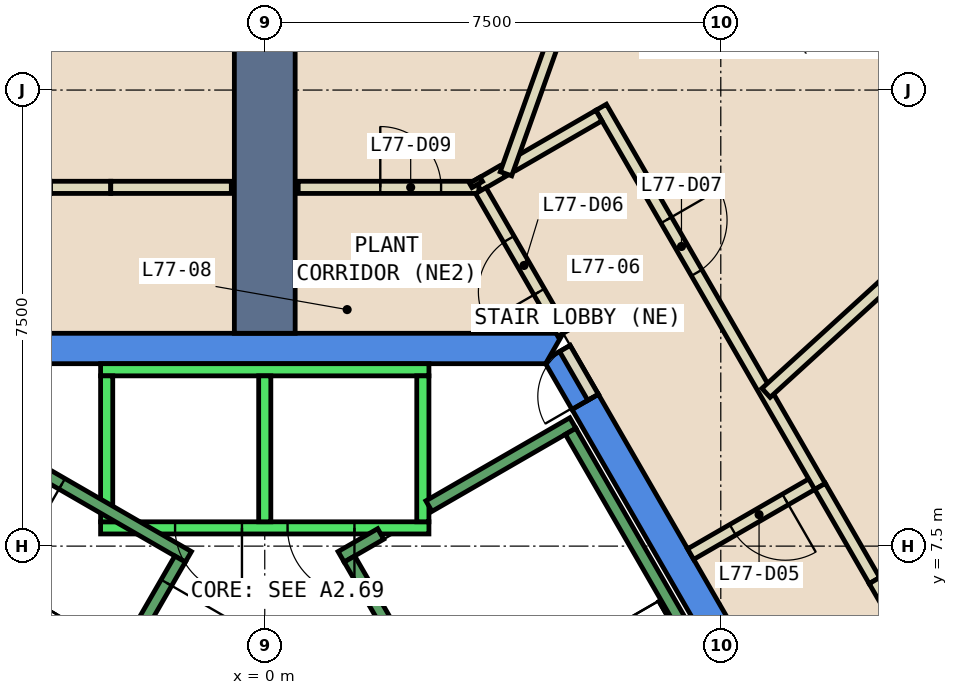
"""IFC4 building model, lengths in metres.
Left out: names, types, materials, properties, quantities, classifications, styles, units other than length and angle.
Written with IfcOpenShell. Run it as: python <this file> out.ifc"""

import sys

from ifc_helpers import new_model, si_unit, direction, frame, frame_2d, origin, place, context, subcontext, project, spatial, polyline, rectangle, outline, extrude, element, fill, save


model = new_model("IFC4")
c1 = context("Model", 3, precision=1e-05, world=origin(), true_north=direction((0.0, 1.0)))
c2 = subcontext(c1, "Body", "Model", "MODEL_VIEW")
j1 = project(units=[si_unit("LENGTHUNIT", "METRE"), si_unit("PLANEANGLEUNIT", "RADIAN")], contexts=[c1])
p1 = place(None, origin())
s1 = spatial("IfcSite", under=j1, at=p1, CompositionType="ELEMENT")
p2 = place(p1, origin())
s2 = spatial("IfcBuilding", under=s1, at=p2, CompositionType="ELEMENT")
p3 = place(p2, frame((0.0, 0.0, 326.0)))
s3 = spatial("IfcBuildingStorey", under=s2, at=p3, CompositionType="ELEMENT", Elevation=326.0)
p4 = place(p3, frame((0.0, 0.0, -0.6)))
e1 = element("IfcWall", 1, at=p4, inside=s3, PredefinedType="SHEAR", context=c2, shape_type="SweptSolid", body=[
    extrude(outline(polyline([(5.486, 9.998), (5.053, 9.748), (9.238, 2.5), (9.815, 2.5), (5.486, 9.998)])), origin(), (0.0, 0.0, 1.0), 5.55),
])
p5 = place(p3, frame((0.0, 0.0, 3.6)))
e2 = element("IfcWall", 2, at=p5, inside=s3, PredefinedType="SHEAR", context=c2, shape_type="SweptSolid", body=[
    extrude(outline(polyline([(5.022, 10.8), (4.677, 10.601), (4.619, 10.5), (5.053, 9.748), (5.486, 9.998), (5.022, 10.8)])), origin(), (0.0, 0.0, 1.0), 1.35),
])
p6 = place(p3, frame((0.0, 0.0, -0.6)))
e3 = element("IfcWall", 3, at=p6, inside=s3, PredefinedType="SHEAR", context=c2, shape_type="SweptSolid", body=[
    extrude(outline(polyline([(4.907, 11.0), (-4.907, 11.0), (-4.619, 10.5), (4.619, 10.5), (4.907, 11.0)])), origin(), (0.0, 0.0, 1.0), 5.55),
])
p7 = place(p3, frame((0.0, 11.0, 0.0), z_axis=(0.0, 0.0, 1.0), x_axis=(0.0, 1.0, 0.0)))
e4 = element("IfcWall", 4, at=p7, inside=s3, PredefinedType="SHEAR", context=c2, shape_type="SweptSolid", body=[
    extrude(rectangle(XDim=13.702, YDim=1.0, at=frame_2d((6.851, 0.0))), origin(), (0.0, 0.0, 1.0), 4.95),
])
p8 = place(p3, frame((9.082, 8.568, 0.0), z_axis=(0.0, 0.0, 1.0), x_axis=(-0.865955154139, -0.50012165622, 0.0)))
e5 = element("IfcWall", 5, at=p8, inside=s3, PredefinedType="PARTITIONING", context=c2, shape_type="SweptSolid", body=[
    extrude(rectangle(XDim=2.4, YDim=0.2, at=frame_2d((1.2, 0.0))), origin(), (0.0, 0.0, 1.0), 4.95),
])
p9 = place(p8, frame((0.6, 0.0, 0.0)))
e6 = element("IfcOpeningElement", 6, at=p9, cuts=e5, PredefinedType="OPENING", context=c2, shape_type="SweptSolid", body=[
    extrude(rectangle(XDim=1.0, YDim=2.1, at=frame_2d((0.5, 1.05))), frame((0.0, 0.11, 0.0), z_axis=(0.0, -1.0, 0.0), x_axis=(1.0, 0.0, 0.0)), (0.0, 0.0, 1.0), 0.22),
])
p10 = place(p3, frame((4.907, 11.0, 0.0), z_axis=(0.0, 0.0, 1.0), x_axis=(-0.5004692653, 0.865754303766, 0.0)))
e7 = element("IfcWall", 7, at=p10, inside=s3, PredefinedType="PARTITIONING", context=c2, shape_type="SweptSolid", body=[
    extrude(rectangle(XDim=0.17, YDim=0.2, at=frame_2d((0.085, 0.0))), origin(), (0.0, 0.0, 1.0), 2.4),
])
p11 = place(p3, frame((5.532, 14.717, 0.0), z_axis=(0.0, 0.0, 1.0), x_axis=(0.499968011863, -0.866043871356, 0.0)))
e8 = element("IfcWall", 8, at=p11, inside=s3, PredefinedType="PARTITIONING", context=c2, shape_type="SweptSolid", body=[
    extrude(rectangle(XDim=7.201, YDim=0.2, at=frame_2d((3.6, 0.0))), origin(), (0.0, 0.0, 1.0), 4.95),
])
p12 = place(p11, frame((2.143, 0.0, 0.0)))
e9 = element("IfcOpeningElement", 9, at=p12, cuts=e8, PredefinedType="OPENING", context=c2, shape_type="SweptSolid", body=[
    extrude(rectangle(XDim=1.0, YDim=2.1, at=frame_2d((0.5, 1.05))), frame((0.0, 0.11, 0.0), z_axis=(0.0, -1.0, 0.0), x_axis=(1.0, 0.0, 0.0)), (0.0, 0.0, 1.0), 0.22),
])
p13 = place(p3, frame((4.088, 13.767, 0.0), z_axis=(0.0, 0.0, 1.0), x_axis=(0.865885317322, 0.500242558411, 0.0)))
e10 = element("IfcWall", 10, at=p13, inside=s3, PredefinedType="PARTITIONING", context=c2, shape_type="SweptSolid", body=[
    extrude(rectangle(XDim=1.625, YDim=0.2, at=frame_2d((0.812, 0.0))), origin(), (0.0, 0.0, 1.0), 4.95),
])
p14 = place(p3, frame((3.504, 13.43, 0.0), z_axis=(0.0, 0.0, 1.0), x_axis=(0.865790651554, 0.500406382535, 0.0)))
e11 = element("IfcWall", 11, at=p14, inside=s3, PredefinedType="PARTITIONING", context=c2, shape_type="SweptSolid", body=[
    extrude(rectangle(XDim=0.474, YDim=0.2, at=frame_2d((0.237, 0.0))), origin(), (0.0, 0.0, 1.0), 2.55),
])
p15 = place(p3, frame((9.133, 8.482, 0.0), z_axis=(0.0, 0.0, 1.0), x_axis=(0.499927291608, -0.866067377925, 0.0)))
e12 = element("IfcWall", 12, at=p15, inside=s3, PredefinedType="PARTITIONING", context=c2, shape_type="SweptSolid", body=[
    extrude(rectangle(XDim=1.788, YDim=0.2, at=frame_2d((0.894, 0.0))), origin(), (0.0, 0.0, 1.0), 4.95),
])
p16 = place(p3, frame((0.55, 13.4, 0.0), z_axis=(0.0, 0.0, 1.0), x_axis=(1.0, 0.0, 0.0)))
e13 = element("IfcWall", 13, at=p16, inside=s3, PredefinedType="PARTITIONING", context=c2, shape_type="SweptSolid", body=[
    extrude(rectangle(XDim=2.971, YDim=0.2, at=frame_2d((1.485, 0.0))), origin(), (0.0, 0.0, 1.0), 4.95),
])
p17 = place(p16, frame((1.35, 0.0, 0.0)))
e14 = element("IfcOpeningElement", 14, at=p17, cuts=e13, PredefinedType="OPENING", context=c2, shape_type="SweptSolid", body=[
    extrude(rectangle(XDim=1.0, YDim=2.1, at=frame_2d((0.5, 1.05))), frame((0.0, 0.11, 0.0), z_axis=(0.0, -1.0, 0.0), x_axis=(1.0, 0.0, 0.0)), (0.0, 0.0, 1.0), 0.22),
])
p18 = place(p3, frame((3.967, 13.623, 0.0), z_axis=(0.0, 0.0, 1.0), x_axis=(0.33592093682, 0.941890186914, 0.0)))
e15 = element("IfcWall", 15, at=p18, inside=s3, PredefinedType="PARTITIONING", context=c2, shape_type="SweptSolid", body=[
    extrude(rectangle(XDim=9.121, YDim=0.2, at=frame_2d((4.561, 0.0))), origin(), (0.0, 0.0, 1.0), 4.95),
])
p19 = place(p3, frame((5.399, 9.948, 0.0), z_axis=(0.0, 0.0, 1.0), x_axis=(-0.499882215713, 0.866093395895, 0.0)))
e16 = element("IfcWall", 16, at=p19, inside=s3, PredefinedType="PARTITIONING", context=c2, shape_type="SweptSolid", body=[
    extrude(rectangle(XDim=0.926, YDim=0.2, at=frame_2d((0.463, 0.0))), origin(), (0.0, 0.0, 1.0), 2.4),
])
p20 = place(p19, frame((0.017, 0.0, 0.0)))
e17 = element("IfcOpeningElement", 17, at=p20, cuts=e16, PredefinedType="OPENING", context=c2, shape_type="SweptSolid", body=[
    extrude(rectangle(XDim=0.9, YDim=2.1, at=frame_2d((0.45, 1.05))), frame((0.0, 0.11, 0.0), z_axis=(0.0, -1.0, 0.0), x_axis=(1.0, 0.0, 0.0)), (0.0, 0.0, 1.0), 0.22),
])
p21 = place(p3, frame((4.822, 11.147, 0.0), z_axis=(0.0, 0.0, 1.0), x_axis=(-0.499841768758, 0.866116739363, 0.0)))
e18 = element("IfcWall", 18, at=p21, inside=s3, PredefinedType="PARTITIONING", context=c2, shape_type="SweptSolid", body=[
    extrude(rectangle(XDim=2.539, YDim=0.2, at=frame_2d((1.27, 0.0))), origin(), (0.0, 0.0, 1.0), 4.95),
])
p22 = place(p21, frame((0.618, 0.0, 0.0)))
e19 = element("IfcOpeningElement", 19, at=p22, cuts=e18, PredefinedType="OPENING", context=c2, shape_type="SweptSolid", body=[
    extrude(rectangle(XDim=1.0, YDim=2.1, at=frame_2d((0.5, 1.05))), frame((0.0, 0.11, 0.0), z_axis=(0.0, -1.0, 0.0), x_axis=(1.0, 0.0, 0.0)), (0.0, 0.0, 1.0), 0.22),
])
p23 = place(p3, frame((3.495, 13.446, 0.0), z_axis=(0.0, 0.0, 1.0), x_axis=(-0.499980071345, 0.866036909293, 0.0)))
e20 = element("IfcWall", 20, at=p23, inside=s3, PredefinedType="PARTITIONING", context=c2, shape_type="SweptSolid", body=[
    extrude(rectangle(XDim=0.082, YDim=0.2, at=frame_2d((0.041, 0.0))), origin(), (0.0, 0.0, 1.0), 2.55),
])
p24 = place(p3, frame((10.027, 6.933, 0.0), z_axis=(0.0, 0.0, 1.0), x_axis=(0.499909789979, -0.8660774803, 0.0)))
e21 = element("IfcWall", 21, at=p24, inside=s3, PredefinedType="PARTITIONING", context=c2, shape_type="SweptSolid", body=[
    extrude(rectangle(XDim=0.94, YDim=0.2, at=frame_2d((0.47, 0.0))), origin(), (0.0, 0.0, 1.0), 2.55),
])
p25 = place(p3, frame((12.564, 13.96, 0.0), z_axis=(0.0, 0.0, 1.0), x_axis=(-0.738865955228, -0.673852432069, 0.0)))
e22 = element("IfcWall", 22, at=p25, inside=s3, PredefinedType="PARTITIONING", context=c2, shape_type="SweptSolid", body=[
    extrude(rectangle(XDim=5.847, YDim=0.2, at=frame_2d((2.923, 0.0))), origin(), (0.0, 0.0, 1.0), 4.95),
])
p26 = place(p3, frame((-3.523, 13.4, 0.0), z_axis=(0.0, 0.0, 1.0), x_axis=(1.0, 0.0, 0.0)))
e23 = element("IfcWall", 23, at=p26, inside=s3, PredefinedType="PARTITIONING", context=c2, shape_type="SweptSolid", body=[
    extrude(rectangle(XDim=0.99, YDim=0.2, at=frame_2d((0.495, 0.0))), origin(), (0.0, 0.0, 1.0), 2.55),
])
p27 = place(p3, frame((-2.533, 13.4, 0.0), z_axis=(0.0, 0.0, 1.0), x_axis=(1.0, 0.0, 0.0)))
e24 = element("IfcWall", 24, at=p27, inside=s3, PredefinedType="PARTITIONING", context=c2, shape_type="SweptSolid", body=[
    extrude(rectangle(XDim=1.983, YDim=0.2, at=frame_2d((0.991, 0.0))), origin(), (0.0, 0.0, 1.0), 4.95),
])
p28 = place(p3, frame((2.7, 7.8, 0.0), z_axis=(0.0, 0.0, 1.0), x_axis=(-1.0, 0.0, 0.0)))
e25 = element("IfcWall", 25, at=p28, inside=s3, PredefinedType="STANDARD", context=c2, shape_type="SweptSolid", body=[
    extrude(rectangle(XDim=5.4, YDim=0.2, at=frame_2d((2.7, 0.0))), origin(), (0.0, 0.0, 1.0), 4.95),
])
p29 = place(p28, frame((1.225, 0.0, 0.0)))
e26 = element("IfcOpeningElement", 26, at=p29, cuts=e25, PredefinedType="OPENING", context=c2, shape_type="SweptSolid", body=[
    extrude(rectangle(XDim=1.1, YDim=2.1, at=frame_2d((0.55, 1.05))), frame((0.0, 0.11, 0.0), z_axis=(0.0, -1.0, 0.0), x_axis=(1.0, 0.0, 0.0)), (0.0, 0.0, 1.0), 0.22),
])
p30 = place(p28, frame((3.075, 0.0, 0.0)))
e27 = element("IfcOpeningElement", 27, at=p30, cuts=e25, PredefinedType="OPENING", context=c2, shape_type="SweptSolid", body=[
    extrude(rectangle(XDim=1.1, YDim=2.1, at=frame_2d((0.55, 1.05))), frame((0.0, 0.11, 0.0), z_axis=(0.0, -1.0, 0.0), x_axis=(1.0, 0.0, 0.0)), (0.0, 0.0, 1.0), 0.22),
])
p31 = place(p3, frame((2.7, 10.4, 0.0), z_axis=(0.0, 0.0, 1.0), x_axis=(-1.0, 0.0, 0.0)))
e28 = element("IfcWall", 28, at=p31, inside=s3, PredefinedType="STANDARD", context=c2, shape_type="SweptSolid", body=[
    extrude(rectangle(XDim=5.4, YDim=0.2, at=frame_2d((2.7, 0.0))), origin(), (0.0, 0.0, 1.0), 4.95),
])
for number, where, z_axis, x_axis in (
    (29, (2.6, 7.9, 0.0), (0.0, 0.0, 1.0), (0.0, 1.0, 0.0)),
    (30, (0.0, 7.9, 0.0), (0.0, 0.0, 1.0), (0.0, 1.0, 0.0)),
    (31, (-2.6, 7.9, 0.0), (0.0, 0.0, 1.0), (0.0, 1.0, 0.0)),
):
    element("IfcWall", number, at=place(p3, frame(where, z_axis=z_axis, x_axis=x_axis)), inside=s3, PredefinedType="STANDARD", context=c2, shape_type="SweptSolid", body=[
        extrude(rectangle(XDim=2.4, YDim=0.2, at=frame_2d((1.2, 0.0))), origin(), (0.0, 0.0, 1.0), 4.95),
    ])
p32 = place(p3, frame((2.7, 8.158, 0.0), z_axis=(0.0, 0.0, 1.0), x_axis=(0.86611865017, 0.499838457731, 0.0)))
e32 = element("IfcWall", 32, at=p32, inside=s3, PredefinedType="STANDARD", context=c2, shape_type="SweptSolid", body=[
    extrude(rectangle(XDim=2.733, YDim=0.2, at=frame_2d((1.366, 0.0))), origin(), (0.0, 0.0, 1.0), 4.95),
])
p33 = place(p3, frame((1.256, 7.324, 0.0), z_axis=(0.0, 0.0, 1.0), x_axis=(0.865915093549, 0.500191014278, 0.0)))
e33 = element("IfcWall", 33, at=p33, inside=s3, PredefinedType="STANDARD", context=c2, shape_type="SweptSolid", body=[
    extrude(rectangle(XDim=0.752, YDim=0.2, at=frame_2d((0.376, 0.0))), origin(), (0.0, 0.0, 1.0), 4.95),
])
p34 = place(p3, frame((4.843, 1.312, 0.0), z_axis=(0.0, 0.0, 1.0), x_axis=(-0.499963383562, 0.866046543262, 0.0)))
e34 = element("IfcWall", 34, at=p34, inside=s3, PredefinedType="STANDARD", context=c2, shape_type="SweptSolid", body=[
    extrude(rectangle(XDim=6.9, YDim=0.2, at=frame_2d((3.45, 0.0))), origin(), (0.0, 0.0, 1.0), 4.95),
])
p35 = place(p34, frame((0.45, 0.0, 0.0)))
e35 = element("IfcOpeningElement", 35, at=p35, cuts=e34, PredefinedType="OPENING", context=c2, shape_type="SweptSolid", body=[
    extrude(rectangle(XDim=1.1, YDim=2.2, at=frame_2d((0.55, 1.1))), frame((0.0, 0.11, 0.0), z_axis=(0.0, -1.0, 0.0), x_axis=(1.0, 0.0, 0.0)), (0.0, 0.0, 1.0), 0.22),
])
p36 = place(p3, frame((8.48, 3.412, 0.0), z_axis=(0.0, 0.0, 1.0), x_axis=(-0.499978703459, 0.866037698999, 0.0)))
e36 = element("IfcWall", 36, at=p36, inside=s3, PredefinedType="STANDARD", context=c2, shape_type="SweptSolid", body=[
    extrude(rectangle(XDim=6.9, YDim=0.2, at=frame_2d((3.45, 0.0))), origin(), (0.0, 0.0, 1.0), 4.95),
])
p37 = place(p3, frame((-1.256, 7.324, 0.0), z_axis=(0.0, 0.0, 1.0), x_axis=(-0.866046073146, 0.499964197906, 0.0)))
e37 = element("IfcWall", 37, at=p37, inside=s3, PredefinedType="STANDARD", context=c2, shape_type="SweptSolid", body=[
    extrude(rectangle(XDim=4.4, YDim=0.2, at=frame_2d((2.2, 0.0))), origin(), (0.0, 0.0, 1.0), 4.95),
])
p38 = place(p37, frame((2.4, 0.0, 0.0)))
e38 = element("IfcOpeningElement", 38, at=p38, cuts=e37, PredefinedType="OPENING", context=c2, shape_type="SweptSolid", body=[
    extrude(rectangle(XDim=1.1, YDim=2.2, at=frame_2d((0.55, 1.1))), frame((0.0, 0.11, 0.0), z_axis=(0.0, -1.0, 0.0), x_axis=(1.0, 0.0, 0.0)), (0.0, 0.0, 1.0), 0.22),
])
p39 = place(p3, frame((-1.393, 7.288, 0.0), z_axis=(0.0, 0.0, 1.0), x_axis=(-0.499963383562, -0.866046543262, 0.0)))
e39 = element("IfcWall", 39, at=p39, inside=s3, PredefinedType="STANDARD", context=c2, shape_type="SweptSolid", body=[
    extrude(rectangle(XDim=6.9, YDim=0.2, at=frame_2d((3.45, 0.0))), origin(), (0.0, 0.0, 1.0), 4.95),
])
p40 = place(p39, frame((0.45, 0.0, 0.0)))
e40 = element("IfcOpeningElement", 40, at=p40, cuts=e39, PredefinedType="OPENING", context=c2, shape_type="SweptSolid", body=[
    extrude(rectangle(XDim=1.1, YDim=2.2, at=frame_2d((0.55, 1.1))), frame((0.0, 0.11, 0.0), z_axis=(0.0, -1.0, 0.0), x_axis=(1.0, 0.0, 0.0)), (0.0, 0.0, 1.0), 0.22),
])
p41 = place(p9, origin())
e41 = element("IfcDoor", 41, at=p41, inside=s3, OperationType="SINGLE_SWING_LEFT", PredefinedType="DOOR", context=c2, shape_type="SweptSolid", body=[
    extrude(rectangle(XDim=1.0, YDim=2.1, at=frame_2d((0.5, 1.05))), frame((0.0, 0.025, 0.0), z_axis=(0.0, -1.0, 0.0), x_axis=(1.0, 0.0, 0.0)), (0.0, 0.0, 1.0), 0.05),
])
fill(e6, e41)
p42 = place(p22, origin())
e42 = element("IfcDoor", 42, at=p42, inside=s3, OperationType="SINGLE_SWING_RIGHT", PredefinedType="DOOR", context=c2, shape_type="SweptSolid", body=[
    extrude(rectangle(XDim=1.0, YDim=2.1, at=frame_2d((0.5, 1.05))), frame((0.0, 0.025, 0.0), z_axis=(0.0, -1.0, 0.0), x_axis=(1.0, 0.0, 0.0)), (0.0, 0.0, 1.0), 0.05),
])
fill(e19, e42)
p43 = place(p12, origin())
e43 = element("IfcDoor", 43, at=p43, inside=s3, OperationType="SINGLE_SWING_LEFT", PredefinedType="DOOR", context=c2, shape_type="SweptSolid", body=[
    extrude(rectangle(XDim=1.0, YDim=2.1, at=frame_2d((0.5, 1.05))), frame((0.0, 0.025, 0.0), z_axis=(0.0, -1.0, 0.0), x_axis=(1.0, 0.0, 0.0)), (0.0, 0.0, 1.0), 0.05),
])
fill(e9, e43)
p44 = place(p17, origin())
e44 = element("IfcDoor", 44, at=p44, inside=s3, OperationType="SINGLE_SWING_LEFT", PredefinedType="DOOR", context=c2, shape_type="SweptSolid", body=[
    extrude(rectangle(XDim=1.0, YDim=2.1, at=frame_2d((0.5, 1.05))), frame((0.0, 0.025, 0.0), z_axis=(0.0, -1.0, 0.0), x_axis=(1.0, 0.0, 0.0)), (0.0, 0.0, 1.0), 0.05),
])
fill(e14, e44)
p45 = place(p20, origin())
e45 = element("IfcDoor", 45, at=p45, inside=s3, OperationType="SINGLE_SWING_LEFT", PredefinedType="DOOR", context=c2, shape_type="SweptSolid", body=[
    extrude(rectangle(XDim=0.9, YDim=2.1, at=frame_2d((0.45, 1.05))), frame((0.0, 0.025, 0.0), z_axis=(0.0, -1.0, 0.0), x_axis=(1.0, 0.0, 0.0)), (0.0, 0.0, 1.0), 0.05),
])
fill(e17, e45)
p46 = place(p29, origin())
e46 = element("IfcDoor", 46, at=p46, inside=s3, OperationType="SLIDING_TO_LEFT", PredefinedType="DOOR", context=c2, shape_type="SweptSolid", body=[
    extrude(rectangle(XDim=1.1, YDim=2.1, at=frame_2d((0.55, 1.05))), frame((0.0, 0.025, 0.0), z_axis=(0.0, -1.0, 0.0), x_axis=(1.0, 0.0, 0.0)), (0.0, 0.0, 1.0), 0.05),
])
fill(e26, e46)
p47 = place(p30, origin())
e47 = element("IfcDoor", 47, at=p47, inside=s3, OperationType="SLIDING_TO_LEFT", PredefinedType="DOOR", context=c2, shape_type="SweptSolid", body=[
    extrude(rectangle(XDim=1.1, YDim=2.1, at=frame_2d((0.55, 1.05))), frame((0.0, 0.025, 0.0), z_axis=(0.0, -1.0, 0.0), x_axis=(1.0, 0.0, 0.0)), (0.0, 0.0, 1.0), 0.05),
])
fill(e27, e47)
p48 = place(p40, origin())
e48 = element("IfcDoor", 48, at=p48, inside=s3, OperationType="SINGLE_SWING_LEFT", PredefinedType="DOOR", context=c2, shape_type="SweptSolid", body=[
    extrude(rectangle(XDim=1.1, YDim=2.2, at=frame_2d((0.55, 1.1))), frame((0.0, 0.025, 0.0), z_axis=(0.0, -1.0, 0.0), x_axis=(1.0, 0.0, 0.0)), (0.0, 0.0, 1.0), 0.05),
])
fill(e40, e48)
p49 = place(p38, origin())
e49 = element("IfcDoor", 49, at=p49, inside=s3, OperationType="SINGLE_SWING_LEFT", PredefinedType="DOOR", context=c2, shape_type="SweptSolid", body=[
    extrude(rectangle(XDim=1.1, YDim=2.2, at=frame_2d((0.55, 1.1))), frame((0.0, 0.025, 0.0), z_axis=(0.0, -1.0, 0.0), x_axis=(1.0, 0.0, 0.0)), (0.0, 0.0, 1.0), 0.05),
])
fill(e38, e49)
save(model, sys.argv[1])
